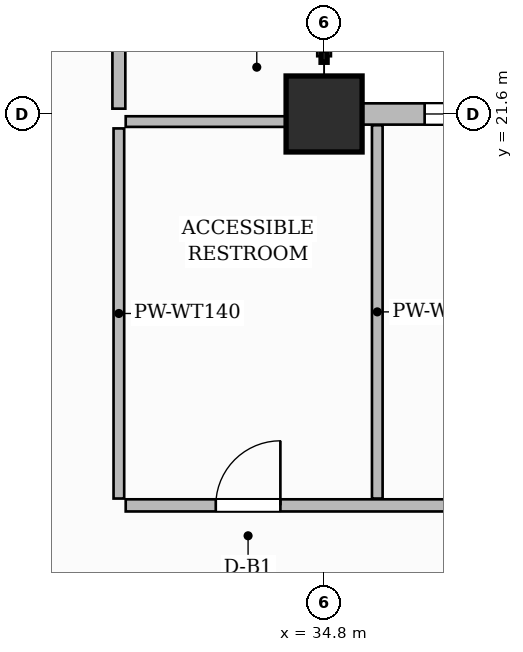
"""IFC4 building model, lengths in metres.
Left out: names, types, materials, properties, quantities, classifications, styles, units other than length and angle.
Written with IfcOpenShell. Run it as: python <this file> out.ifc"""

import sys

from ifc_helpers import new_model, si_unit, direction, frame, frame_2d, origin, origin_2d, place, context, subcontext, project, spatial, rectangle, extrude, source, transform, mapped, element, fill, save


model = new_model("IFC4")
c1 = context("Model", 3, precision=1e-05, world=origin(), true_north=direction((0.0, 1.0)))
c2 = subcontext(c1, "Body", "Model", "MODEL_VIEW")
j1 = project(units=[si_unit("LENGTHUNIT", "METRE"), si_unit("PLANEANGLEUNIT", "RADIAN")], contexts=[c1])
p1 = place(None, origin())
s1 = spatial("IfcSite", under=j1, at=p1, CompositionType="ELEMENT")
p2 = place(p1, origin())
s2 = spatial("IfcBuilding", under=s1, at=p2, CompositionType="ELEMENT")
p3 = place(p2, frame((0.0, 0.0, 126.6)))
s3 = spatial("IfcBuildingStorey", under=s2, at=p3, CompositionType="ELEMENT", Elevation=126.6)
m1 = source(origin(), c2, "Body", "SweptSolid", [
    extrude(rectangle(XDim=1.0, YDim=1.0, at=origin_2d()), origin(), (0.0, 0.0, 1.0), 3.7),
])
p4 = place(p3, frame((34.8, 21.6, 0.0), z_axis=(0.0, 0.0, 1.0), x_axis=(1.0, 0.0, 0.0)))
e1 = element("IfcColumn", 1, at=p4, inside=s3, PredefinedType="COLUMN", context=c2, shape_type="MappedRepresentation", body=[
    mapped(m1, transform((0.0, 0.0, 0.0), scale=1.0)),
])
p5 = place(p3, frame((32.19, 16.45, 0.0), z_axis=(0.0, 0.0, 1.0), x_axis=(1.0, 0.0, 0.0)))
e2 = element("IfcWall", 2, at=p5, inside=s3, PredefinedType="PARTITIONING", context=c2, shape_type="SweptSolid", body=[
    extrude(rectangle(XDim=17.47, YDim=0.16, at=frame_2d((8.735, 0.0))), origin(), (0.0, 0.0, 1.0), 3.45),
])
p6 = place(p5, frame((1.185, 0.0, 0.0)))
e3 = element("IfcOpeningElement", 3, at=p6, cuts=e2, PredefinedType="OPENING", context=c2, shape_type="SweptSolid", body=[
    extrude(rectangle(XDim=0.85, YDim=2.1, at=frame_2d((0.425, 1.05))), frame((0.0, 0.09, 0.0), z_axis=(0.0, -1.0, 0.0), x_axis=(1.0, 0.0, 0.0)), (0.0, 0.0, 1.0), 0.18),
])
p7 = place(p5, frame((5.71, 0.0, 0.0)))
e4 = element("IfcOpeningElement", 4, at=p7, cuts=e2, PredefinedType="OPENING", context=c2, shape_type="SweptSolid", body=[
    extrude(rectangle(XDim=0.9, YDim=2.15, at=frame_2d((0.45, 1.075))), frame((0.0, 0.09, 0.0), z_axis=(0.0, -1.0, 0.0), x_axis=(1.0, 0.0, 0.0)), (0.0, 0.0, 1.0), 0.18),
])
p8 = place(p5, frame((12.56, 0.0, 0.0)))
e5 = element("IfcOpeningElement", 5, at=p8, cuts=e2, PredefinedType="OPENING", context=c2, shape_type="SweptSolid", body=[
    extrude(rectangle(XDim=1.4, YDim=2.35, at=frame_2d((0.7, 1.175))), frame((0.0, 0.09, 0.0), z_axis=(0.0, -1.0, 0.0), x_axis=(1.0, 0.0, 0.0)), (0.0, 0.0, 1.0), 0.18),
])
p9 = place(p3, frame((32.1, 16.54, 0.0), z_axis=(0.0, 0.0, 1.0), x_axis=(0.0, 1.0, 0.0)))
e6 = element("IfcWall", 6, at=p9, inside=s3, PredefinedType="PARTITIONING", context=c2, shape_type="SweptSolid", body=[
    extrude(rectangle(XDim=4.87, YDim=0.14, at=frame_2d((2.435, 0.0))), origin(), (0.0, 0.0, 1.0), 3.45),
])
p10 = place(p3, frame((35.5, 16.54, 0.0), z_axis=(0.0, 0.0, 1.0), x_axis=(0.0, 1.0, 0.0)))
e7 = element("IfcWall", 7, at=p10, inside=s3, PredefinedType="PARTITIONING", context=c2, shape_type="SweptSolid", body=[
    extrude(rectangle(XDim=4.912, YDim=0.14, at=frame_2d((2.456, 0.0))), origin(), (0.0, 0.0, 1.0), 3.45),
])
p11 = place(p3, frame((32.19, 21.5, 0.0), z_axis=(0.0, 0.0, 1.0), x_axis=(1.0, 0.0, 0.0)))
e8 = element("IfcWall", 8, at=p11, inside=s3, PredefinedType="PARTITIONING", context=c2, shape_type="SweptSolid", body=[
    extrude(rectangle(XDim=2.42, YDim=0.14, at=frame_2d((1.21, 0.0))), origin(), (0.0, 0.0, 1.0), 2.935),
])
p12 = place(p3, frame((32.1, 21.67, 0.0), z_axis=(0.0, 0.0, 1.0), x_axis=(0.0, 1.0, 0.0)))
e9 = element("IfcWall", 9, at=p12, inside=s3, PredefinedType="PARTITIONING", context=c2, shape_type="SweptSolid", body=[
    extrude(rectangle(XDim=10.702, YDim=0.17, at=frame_2d((5.351, 0.0))), origin(), (0.0, 0.0, 1.0), 3.45),
])
p13 = place(p12, frame((1.53, 0.0, 0.0)))
e10 = element("IfcOpeningElement", 10, at=p13, cuts=e9, PredefinedType="OPENING", context=c2, shape_type="SweptSolid", body=[
    extrude(rectangle(XDim=0.9, YDim=2.15, at=frame_2d((0.45, 1.075))), frame((0.0, 0.095, 0.0), z_axis=(0.0, -1.0, 0.0), x_axis=(1.0, 0.0, 0.0)), (0.0, 0.0, 1.0), 0.19),
])
p14 = place(p12, frame((6.78, 0.0, 0.0)))
e11 = element("IfcOpeningElement", 11, at=p14, cuts=e9, PredefinedType="OPENING", context=c2, shape_type="SweptSolid", body=[
    extrude(rectangle(XDim=0.9, YDim=2.15, at=frame_2d((0.45, 1.075))), frame((0.0, 0.095, 0.0), z_axis=(0.0, -1.0, 0.0), x_axis=(1.0, 0.0, 0.0)), (0.0, 0.0, 1.0), 0.19),
])
p15 = place(p3, frame((34.8, 21.6, 0.0), z_axis=(0.0, 0.0, 1.0), x_axis=(1.0, 0.0, 0.0)))
e12 = element("IfcWall", 12, at=p15, inside=s3, PredefinedType="SOLIDWALL", context=c2, shape_type="SweptSolid", body=[
    extrude(rectangle(XDim=15.0, YDim=0.28, at=frame_2d((7.5, 0.0))), origin(), (0.0, 0.0, 1.0), 2.935),
])
p16 = place(p15, frame((1.323, 0.0, 0.8)))
e13 = element("IfcOpeningElement", 13, at=p16, cuts=e12, PredefinedType="OPENING", context=c2, shape_type="SweptSolid", body=[
    extrude(rectangle(XDim=1.8, YDim=1.85, at=frame_2d((0.9, 0.925))), frame((0.0, 0.15, 0.0), z_axis=(0.0, -1.0, 0.0), x_axis=(1.0, 0.0, 0.0)), (0.0, 0.0, 1.0), 0.3),
])
p17 = place(p15, frame((4.069, 0.0, 0.8)))
e14 = element("IfcOpeningElement", 14, at=p17, cuts=e12, PredefinedType="OPENING", context=c2, shape_type="SweptSolid", body=[
    extrude(rectangle(XDim=1.8, YDim=1.85, at=frame_2d((0.9, 0.925))), frame((0.0, 0.15, 0.0), z_axis=(0.0, -1.0, 0.0), x_axis=(1.0, 0.0, 0.0)), (0.0, 0.0, 1.0), 0.3),
])
p18 = place(p15, frame((8.675, 0.0, 0.8)))
e15 = element("IfcOpeningElement", 15, at=p18, cuts=e12, PredefinedType="OPENING", context=c2, shape_type="SweptSolid", body=[
    extrude(rectangle(XDim=1.8, YDim=1.85, at=frame_2d((0.9, 0.925))), frame((0.0, 0.15, 0.0), z_axis=(0.0, -1.0, 0.0), x_axis=(1.0, 0.0, 0.0)), (0.0, 0.0, 1.0), 0.3),
])
p19 = place(p15, frame((11.725, 0.0, 0.8)))
e16 = element("IfcOpeningElement", 16, at=p19, cuts=e12, PredefinedType="OPENING", context=c2, shape_type="SweptSolid", body=[
    extrude(rectangle(XDim=1.8, YDim=1.85, at=frame_2d((0.9, 0.925))), frame((0.0, 0.15, 0.0), z_axis=(0.0, -1.0, 0.0), x_axis=(1.0, 0.0, 0.0)), (0.0, 0.0, 1.0), 0.3),
])
m2 = source(origin(), c2, "Body", "SweptSolid", [
    extrude(rectangle(XDim=0.85, YDim=2.1, at=frame_2d((0.425, 1.05))), frame((0.0, 0.025, 0.0), z_axis=(0.0, -1.0, 0.0), x_axis=(1.0, 0.0, 0.0)), (0.0, 0.0, 1.0), 0.05),
])
p20 = place(p6, origin())
e17 = element("IfcDoor", 17, at=p20, inside=s3, OperationType="SINGLE_SWING_RIGHT", PredefinedType="DOOR", context=c2, shape_type="MappedRepresentation", body=[
    mapped(m2, transform((0.0, 0.0, 0.0), scale=1.0)),
])
fill(e3, e17)
m3 = source(origin(), c2, "Body", "SweptSolid", [
    extrude(rectangle(XDim=1.8, YDim=1.85, at=frame_2d((0.9, 0.925))), frame((0.0, 0.03, 0.0), z_axis=(0.0, -1.0, 0.0), x_axis=(1.0, 0.0, 0.0)), (0.0, 0.0, 1.0), 0.06),
])
p21 = place(p16, origin())
e18 = element("IfcWindow", 18, at=p21, inside=s3, PartitioningType="DOUBLE_PANEL_VERTICAL", PredefinedType="WINDOW", context=c2, shape_type="MappedRepresentation", body=[
    mapped(m3, transform((0.0, 0.0, 0.0), scale=1.0)),
])
fill(e13, e18)
save(model, sys.argv[1])
